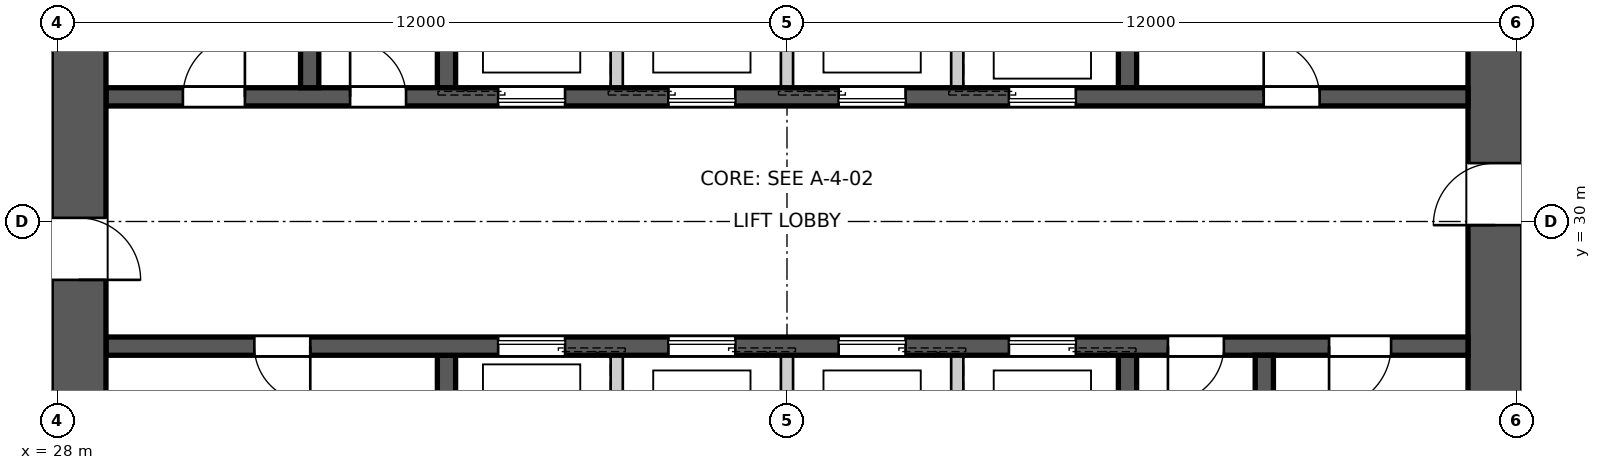
"""IFC4 building model, lengths in metres.
Left out: names, types, materials, properties, quantities, classifications, styles, units other than length and angle.
Written with IfcOpenShell. Run it as: python <this file> out.ifc"""

import sys

from ifc_helpers import new_model, si_unit, direction, frame, frame_2d, origin, place, context, subcontext, project, spatial, polyline, rectangle, outline, extrude, element, fill, save


model = new_model("IFC4")
c1 = context("Model", 3, precision=1e-05, world=origin(), true_north=direction((0.0, 1.0)))
c2 = subcontext(c1, "Body", "Model", "MODEL_VIEW")
j1 = project(units=[si_unit("LENGTHUNIT", "METRE"), si_unit("PLANEANGLEUNIT", "RADIAN")], contexts=[c1])
p1 = place(None, origin())
s1 = spatial("IfcSite", under=j1, at=p1, CompositionType="ELEMENT")
p2 = place(p1, origin())
s2 = spatial("IfcBuilding", under=s1, at=p2, CompositionType="ELEMENT")
p3 = place(p2, origin())
s3 = spatial("IfcBuildingStorey", under=s2, at=p3, CompositionType="ELEMENT", Elevation=0.0)
p4 = place(p3, frame((51.65, 18.8, 0.0), z_axis=(0.0, 0.0, 1.0), x_axis=(0.0, 1.0, 0.0)))
e1 = element("IfcWall", 1, at=p4, inside=s3, PredefinedType="SHEAR", context=c2, shape_type="SweptSolid", body=[
    extrude(outline(polyline([(0.0, -0.45), (22.4, -0.45), (22.4, -0.025), (22.85, -0.025), (22.85, 0.025), (22.4, 0.025), (22.4, 0.45), (0.0, 0.45), (0.0, 0.025), (-0.45, 0.025), (-0.45, -0.025), (0.0, -0.025), (0.0, -0.45)])), origin(), (0.0, 0.0, 1.0), 6.0),
])
p5 = place(p4, frame((11.14, 0.0, 0.0)))
e2 = element("IfcOpeningElement", 2, at=p5, cuts=e1, PredefinedType="OPENING", context=c2, shape_type="SweptSolid", body=[
    extrude(rectangle(XDim=1.02, YDim=2.4, at=frame_2d((0.51, 1.2))), frame((0.0, 0.46, 0.0), z_axis=(0.0, -1.0, 0.0), x_axis=(1.0, 0.0, 0.0)), (0.0, 0.0, 1.0), 0.92),
])
p6 = place(p3, frame((28.35, 41.2, 0.0), z_axis=(0.0, 0.0, 1.0), x_axis=(0.0, -1.0, 0.0)))
e3 = element("IfcWall", 3, at=p6, inside=s3, PredefinedType="SHEAR", context=c2, shape_type="SweptSolid", body=[
    extrude(outline(polyline([(0.0, -0.45), (22.4, -0.45), (22.4, -0.025), (22.85, -0.025), (22.85, 0.025), (22.4, 0.025), (22.4, 0.45), (0.0, 0.45), (0.0, 0.025), (-0.45, 0.025), (-0.45, -0.025), (0.0, -0.025), (0.0, -0.45)])), origin(), (0.0, 0.0, 1.0), 6.0),
])
p7 = place(p6, frame((11.14, 0.0, 0.0)))
e4 = element("IfcOpeningElement", 4, at=p7, cuts=e3, PredefinedType="OPENING", context=c2, shape_type="SweptSolid", body=[
    extrude(rectangle(XDim=1.02, YDim=2.4, at=frame_2d((0.51, 1.2))), frame((0.0, 0.46, 0.0), z_axis=(0.0, -1.0, 0.0), x_axis=(1.0, 0.0, 0.0)), (0.0, 0.0, 1.0), 0.92),
])
p8 = place(p3, frame((28.8, 32.05, 0.0), z_axis=(0.0, 0.0, 1.0), x_axis=(1.0, 0.0, 0.0)))
e5 = element("IfcWall", 5, at=p8, inside=s3, PredefinedType="SHEAR", context=c2, shape_type="SweptSolid", body=[
    extrude(rectangle(XDim=22.4, YDim=0.3, at=frame_2d((11.2, 0.0))), origin(), (0.0, 0.0, 1.0), 6.0),
])
p9 = place(p8, frame((19.04, 0.0, 0.0)))
e6 = element("IfcOpeningElement", 6, at=p9, cuts=e5, PredefinedType="OPENING", context=c2, shape_type="SweptSolid", body=[
    extrude(rectangle(XDim=0.92, YDim=2.1, at=frame_2d((0.46, 1.05))), frame((0.0, 0.16, 0.0), z_axis=(0.0, -1.0, 0.0), x_axis=(1.0, 0.0, 0.0)), (0.0, 0.0, 1.0), 0.32),
])
p10 = place(p8, frame((1.265, 0.0, 0.0)))
e7 = element("IfcOpeningElement", 7, at=p10, cuts=e5, PredefinedType="OPENING", context=c2, shape_type="SweptSolid", body=[
    extrude(rectangle(XDim=1.02, YDim=2.1, at=frame_2d((0.51, 1.05))), frame((0.0, 0.16, 0.0), z_axis=(0.0, -1.0, 0.0), x_axis=(1.0, 0.0, 0.0)), (0.0, 0.0, 1.0), 0.32),
])
p11 = place(p8, frame((4.015, 0.0, 0.0)))
e8 = element("IfcOpeningElement", 8, at=p11, cuts=e5, PredefinedType="OPENING", context=c2, shape_type="SweptSolid", body=[
    extrude(rectangle(XDim=0.92, YDim=2.1, at=frame_2d((0.46, 1.05))), frame((0.0, 0.16, 0.0), z_axis=(0.0, -1.0, 0.0), x_axis=(1.0, 0.0, 0.0)), (0.0, 0.0, 1.0), 0.32),
])
p12 = place(p8, frame((6.45, 0.0, 0.0)))
e9 = element("IfcOpeningElement", 9, at=p12, cuts=e5, PredefinedType="OPENING", context=c2, shape_type="SweptSolid", body=[
    extrude(rectangle(XDim=1.1, YDim=2.1, at=frame_2d((0.55, 1.05))), frame((0.0, 0.16, 0.0), z_axis=(0.0, -1.0, 0.0), x_axis=(1.0, 0.0, 0.0)), (0.0, 0.0, 1.0), 0.32),
])
p13 = place(p8, frame((9.25, 0.0, 0.0)))
e10 = element("IfcOpeningElement", 10, at=p13, cuts=e5, PredefinedType="OPENING", context=c2, shape_type="SweptSolid", body=[
    extrude(rectangle(XDim=1.1, YDim=2.1, at=frame_2d((0.55, 1.05))), frame((0.0, 0.16, 0.0), z_axis=(0.0, -1.0, 0.0), x_axis=(1.0, 0.0, 0.0)), (0.0, 0.0, 1.0), 0.32),
])
p14 = place(p8, frame((12.05, 0.0, 0.0)))
e11 = element("IfcOpeningElement", 11, at=p14, cuts=e5, PredefinedType="OPENING", context=c2, shape_type="SweptSolid", body=[
    extrude(rectangle(XDim=1.1, YDim=2.1, at=frame_2d((0.55, 1.05))), frame((0.0, 0.16, 0.0), z_axis=(0.0, -1.0, 0.0), x_axis=(1.0, 0.0, 0.0)), (0.0, 0.0, 1.0), 0.32),
])
p15 = place(p8, frame((14.85, 0.0, 0.0)))
e12 = element("IfcOpeningElement", 12, at=p15, cuts=e5, PredefinedType="OPENING", context=c2, shape_type="SweptSolid", body=[
    extrude(rectangle(XDim=1.1, YDim=2.1, at=frame_2d((0.55, 1.05))), frame((0.0, 0.16, 0.0), z_axis=(0.0, -1.0, 0.0), x_axis=(1.0, 0.0, 0.0)), (0.0, 0.0, 1.0), 0.32),
])
p16 = place(p3, frame((51.2, 27.95, 0.0), z_axis=(0.0, 0.0, 1.0), x_axis=(-1.0, 0.0, 0.0)))
e13 = element("IfcWall", 13, at=p16, inside=s3, PredefinedType="SHEAR", context=c2, shape_type="SweptSolid", body=[
    extrude(rectangle(XDim=22.4, YDim=0.3, at=frame_2d((11.2, 0.0))), origin(), (0.0, 0.0, 1.0), 6.0),
])
p17 = place(p16, frame((19.04, 0.0, 0.0)))
e14 = element("IfcOpeningElement", 14, at=p17, cuts=e13, PredefinedType="OPENING", context=c2, shape_type="SweptSolid", body=[
    extrude(rectangle(XDim=0.92, YDim=2.1, at=frame_2d((0.46, 1.05))), frame((0.0, 0.16, 0.0), z_axis=(0.0, -1.0, 0.0), x_axis=(1.0, 0.0, 0.0)), (0.0, 0.0, 1.0), 0.32),
])
p18 = place(p16, frame((1.265, 0.0, 0.0)))
e15 = element("IfcOpeningElement", 15, at=p18, cuts=e13, PredefinedType="OPENING", context=c2, shape_type="SweptSolid", body=[
    extrude(rectangle(XDim=1.02, YDim=2.1, at=frame_2d((0.51, 1.05))), frame((0.0, 0.16, 0.0), z_axis=(0.0, -1.0, 0.0), x_axis=(1.0, 0.0, 0.0)), (0.0, 0.0, 1.0), 0.32),
])
p19 = place(p16, frame((4.015, 0.0, 0.0)))
e16 = element("IfcOpeningElement", 16, at=p19, cuts=e13, PredefinedType="OPENING", context=c2, shape_type="SweptSolid", body=[
    extrude(rectangle(XDim=0.92, YDim=2.1, at=frame_2d((0.46, 1.05))), frame((0.0, 0.16, 0.0), z_axis=(0.0, -1.0, 0.0), x_axis=(1.0, 0.0, 0.0)), (0.0, 0.0, 1.0), 0.32),
])
p20 = place(p16, frame((6.45, 0.0, 0.0)))
e17 = element("IfcOpeningElement", 17, at=p20, cuts=e13, PredefinedType="OPENING", context=c2, shape_type="SweptSolid", body=[
    extrude(rectangle(XDim=1.1, YDim=2.1, at=frame_2d((0.55, 1.05))), frame((0.0, 0.16, 0.0), z_axis=(0.0, -1.0, 0.0), x_axis=(1.0, 0.0, 0.0)), (0.0, 0.0, 1.0), 0.32),
])
p21 = place(p16, frame((9.25, 0.0, 0.0)))
e18 = element("IfcOpeningElement", 18, at=p21, cuts=e13, PredefinedType="OPENING", context=c2, shape_type="SweptSolid", body=[
    extrude(rectangle(XDim=1.1, YDim=2.1, at=frame_2d((0.55, 1.05))), frame((0.0, 0.16, 0.0), z_axis=(0.0, -1.0, 0.0), x_axis=(1.0, 0.0, 0.0)), (0.0, 0.0, 1.0), 0.32),
])
p22 = place(p16, frame((12.05, 0.0, 0.0)))
e19 = element("IfcOpeningElement", 19, at=p22, cuts=e13, PredefinedType="OPENING", context=c2, shape_type="SweptSolid", body=[
    extrude(rectangle(XDim=1.1, YDim=2.1, at=frame_2d((0.55, 1.05))), frame((0.0, 0.16, 0.0), z_axis=(0.0, -1.0, 0.0), x_axis=(1.0, 0.0, 0.0)), (0.0, 0.0, 1.0), 0.32),
])
p23 = place(p16, frame((14.85, 0.0, 0.0)))
e20 = element("IfcOpeningElement", 20, at=p23, cuts=e13, PredefinedType="OPENING", context=c2, shape_type="SweptSolid", body=[
    extrude(rectangle(XDim=1.1, YDim=2.1, at=frame_2d((0.55, 1.05))), frame((0.0, 0.16, 0.0), z_axis=(0.0, -1.0, 0.0), x_axis=(1.0, 0.0, 0.0)), (0.0, 0.0, 1.0), 0.32),
])
for number, where, z_axis, x_axis in (
    (21, (34.4, 32.2, 0.0), (0.0, 0.0, 1.0), (0.0, 1.0, 0.0)),
    (22, (45.6, 27.8, 0.0), (0.0, 0.0, 1.0), (0.0, -1.0, 0.0)),
):
    element("IfcWall", number, at=place(p3, frame(where, z_axis=z_axis, x_axis=x_axis)), inside=s3, PredefinedType="SHEAR", context=c2, shape_type="SweptSolid", body=[
        extrude(rectangle(XDim=2.8, YDim=0.3, at=frame_2d((1.4, 0.0))), origin(), (0.0, 0.0, 1.0), 6.0),
    ])
for number, where, z_axis, x_axis in (
    (23, (37.2, 32.2, 0.0), (0.0, 0.0, 1.0), (0.0, 1.0, 0.0)),
    (24, (42.8, 27.8, 0.0), (0.0, 0.0, 1.0), (0.0, -1.0, 0.0)),
    (25, (40.0, 32.2, 0.0), (0.0, 0.0, 1.0), (0.0, 1.0, 0.0)),
    (26, (40.0, 27.8, 0.0), (0.0, 0.0, 1.0), (0.0, -1.0, 0.0)),
    (27, (42.8, 32.2, 0.0), (0.0, 0.0, 1.0), (0.0, 1.0, 0.0)),
    (28, (37.2, 27.8, 0.0), (0.0, 0.0, 1.0), (0.0, -1.0, 0.0)),
):
    element("IfcWall", number, at=place(p3, frame(where, z_axis=z_axis, x_axis=x_axis)), inside=s3, PredefinedType="SOLIDWALL", context=c2, shape_type="SweptSolid", body=[
        extrude(rectangle(XDim=2.8, YDim=0.2, at=frame_2d((1.4, 0.0))), origin(), (0.0, 0.0, 1.0), 6.0),
    ])
for number, where, z_axis, x_axis in (
    (29, (45.6, 32.2, 0.0), (0.0, 0.0, 1.0), (0.0, 1.0, 0.0)),
    (30, (34.4, 27.8, 0.0), (0.0, 0.0, 1.0), (0.0, -1.0, 0.0)),
):
    element("IfcWall", number, at=place(p3, frame(where, z_axis=z_axis, x_axis=x_axis)), inside=s3, PredefinedType="SHEAR", context=c2, shape_type="SweptSolid", body=[
        extrude(rectangle(XDim=2.8, YDim=0.3, at=frame_2d((1.4, 0.0))), origin(), (0.0, 0.0, 1.0), 6.0),
    ])
for number, where, z_axis, x_axis in (
    (31, (32.15, 32.2, 0.0), (0.0, 0.0, 1.0), (0.0, 1.0, 0.0)),
    (32, (47.85, 27.8, 0.0), (0.0, 0.0, 1.0), (0.0, -1.0, 0.0)),
):
    element("IfcWall", number, at=place(p3, frame(where, z_axis=z_axis, x_axis=x_axis)), inside=s3, PredefinedType="SHEAR", context=c2, shape_type="SweptSolid", body=[
        extrude(rectangle(XDim=7.7, YDim=0.3, at=frame_2d((3.85, 0.0))), origin(), (0.0, 0.0, 1.0), 6.0),
    ])
p24 = place(p9, origin())
e33 = element("IfcDoor", 33, at=p24, inside=s3, OperationType="SINGLE_SWING_LEFT", PredefinedType="DOOR", context=c2, shape_type="SweptSolid", body=[
    extrude(rectangle(XDim=0.92, YDim=2.1, at=frame_2d((0.46, 1.05))), frame((0.0, 0.025, 0.0), z_axis=(0.0, -1.0, 0.0), x_axis=(1.0, 0.0, 0.0)), (0.0, 0.0, 1.0), 0.05),
])
fill(e6, e33)
p25 = place(p17, origin())
e34 = element("IfcDoor", 34, at=p25, inside=s3, OperationType="SINGLE_SWING_LEFT", PredefinedType="DOOR", context=c2, shape_type="SweptSolid", body=[
    extrude(rectangle(XDim=0.92, YDim=2.1, at=frame_2d((0.46, 1.05))), frame((0.0, 0.025, 0.0), z_axis=(0.0, -1.0, 0.0), x_axis=(1.0, 0.0, 0.0)), (0.0, 0.0, 1.0), 0.05),
])
fill(e14, e34)
p26 = place(p18, origin())
e35 = element("IfcDoor", 35, at=p26, inside=s3, OperationType="SINGLE_SWING_RIGHT", PredefinedType="DOOR", context=c2, shape_type="SweptSolid", body=[
    extrude(rectangle(XDim=1.02, YDim=2.1, at=frame_2d((0.51, 1.05))), frame((0.0, 0.025, 0.0), z_axis=(0.0, -1.0, 0.0), x_axis=(1.0, 0.0, 0.0)), (0.0, 0.0, 1.0), 0.05),
])
fill(e15, e35)
p27 = place(p10, origin())
e36 = element("IfcDoor", 36, at=p27, inside=s3, OperationType="SINGLE_SWING_RIGHT", PredefinedType="DOOR", context=c2, shape_type="SweptSolid", body=[
    extrude(rectangle(XDim=1.02, YDim=2.1, at=frame_2d((0.51, 1.05))), frame((0.0, 0.025, 0.0), z_axis=(0.0, -1.0, 0.0), x_axis=(1.0, 0.0, 0.0)), (0.0, 0.0, 1.0), 0.05),
])
fill(e7, e36)
p28 = place(p11, origin())
e37 = element("IfcDoor", 37, at=p28, inside=s3, OperationType="SINGLE_SWING_LEFT", PredefinedType="DOOR", context=c2, shape_type="SweptSolid", body=[
    extrude(rectangle(XDim=0.92, YDim=2.1, at=frame_2d((0.46, 1.05))), frame((0.0, 0.025, 0.0), z_axis=(0.0, -1.0, 0.0), x_axis=(1.0, 0.0, 0.0)), (0.0, 0.0, 1.0), 0.05),
])
fill(e8, e37)
p29 = place(p19, origin())
e38 = element("IfcDoor", 38, at=p29, inside=s3, OperationType="SINGLE_SWING_RIGHT", PredefinedType="DOOR", context=c2, shape_type="SweptSolid", body=[
    extrude(rectangle(XDim=0.92, YDim=2.1, at=frame_2d((0.46, 1.05))), frame((0.0, 0.025, 0.0), z_axis=(0.0, -1.0, 0.0), x_axis=(1.0, 0.0, 0.0)), (0.0, 0.0, 1.0), 0.05),
])
fill(e16, e38)
p30 = place(p5, origin())
e39 = element("IfcDoor", 39, at=p30, inside=s3, OperationType="SINGLE_SWING_LEFT", PredefinedType="DOOR", context=c2, shape_type="SweptSolid", body=[
    extrude(rectangle(XDim=1.02, YDim=2.4, at=frame_2d((0.51, 1.2))), frame((0.0, 0.025, 0.0), z_axis=(0.0, -1.0, 0.0), x_axis=(1.0, 0.0, 0.0)), (0.0, 0.0, 1.0), 0.05),
])
fill(e2, e39)
p31 = place(p7, origin())
e40 = element("IfcDoor", 40, at=p31, inside=s3, OperationType="SINGLE_SWING_RIGHT", PredefinedType="DOOR", context=c2, shape_type="SweptSolid", body=[
    extrude(rectangle(XDim=1.02, YDim=2.4, at=frame_2d((0.51, 1.2))), frame((0.0, 0.025, 0.0), z_axis=(0.0, -1.0, 0.0), x_axis=(1.0, 0.0, 0.0)), (0.0, 0.0, 1.0), 0.05),
])
fill(e4, e40)
p32 = place(p12, origin())
e41 = element("IfcDoor", 41, at=p32, inside=s3, OperationType="SLIDING_TO_LEFT", PredefinedType="DOOR", context=c2, shape_type="SweptSolid", body=[
    extrude(rectangle(XDim=1.1, YDim=2.1, at=frame_2d((0.55, 1.05))), frame((0.0, 0.025, 0.0), z_axis=(0.0, -1.0, 0.0), x_axis=(1.0, 0.0, 0.0)), (0.0, 0.0, 1.0), 0.05),
])
fill(e9, e41)
p33 = place(p20, origin())
e42 = element("IfcDoor", 42, at=p33, inside=s3, OperationType="SLIDING_TO_LEFT", PredefinedType="DOOR", context=c2, shape_type="SweptSolid", body=[
    extrude(rectangle(XDim=1.1, YDim=2.1, at=frame_2d((0.55, 1.05))), frame((0.0, 0.025, 0.0), z_axis=(0.0, -1.0, 0.0), x_axis=(1.0, 0.0, 0.0)), (0.0, 0.0, 1.0), 0.05),
])
fill(e17, e42)
p34 = place(p13, origin())
e43 = element("IfcDoor", 43, at=p34, inside=s3, OperationType="SLIDING_TO_LEFT", PredefinedType="DOOR", context=c2, shape_type="SweptSolid", body=[
    extrude(rectangle(XDim=1.1, YDim=2.1, at=frame_2d((0.55, 1.05))), frame((0.0, 0.025, 0.0), z_axis=(0.0, -1.0, 0.0), x_axis=(1.0, 0.0, 0.0)), (0.0, 0.0, 1.0), 0.05),
])
fill(e10, e43)
p35 = place(p21, origin())
e44 = element("IfcDoor", 44, at=p35, inside=s3, OperationType="SLIDING_TO_LEFT", PredefinedType="DOOR", context=c2, shape_type="SweptSolid", body=[
    extrude(rectangle(XDim=1.1, YDim=2.1, at=frame_2d((0.55, 1.05))), frame((0.0, 0.025, 0.0), z_axis=(0.0, -1.0, 0.0), x_axis=(1.0, 0.0, 0.0)), (0.0, 0.0, 1.0), 0.05),
])
fill(e18, e44)
p36 = place(p14, origin())
e45 = element("IfcDoor", 45, at=p36, inside=s3, OperationType="SLIDING_TO_LEFT", PredefinedType="DOOR", context=c2, shape_type="SweptSolid", body=[
    extrude(rectangle(XDim=1.1, YDim=2.1, at=frame_2d((0.55, 1.05))), frame((0.0, 0.025, 0.0), z_axis=(0.0, -1.0, 0.0), x_axis=(1.0, 0.0, 0.0)), (0.0, 0.0, 1.0), 0.05),
])
fill(e11, e45)
p37 = place(p22, origin())
e46 = element("IfcDoor", 46, at=p37, inside=s3, OperationType="SLIDING_TO_LEFT", PredefinedType="DOOR", context=c2, shape_type="SweptSolid", body=[
    extrude(rectangle(XDim=1.1, YDim=2.1, at=frame_2d((0.55, 1.05))), frame((0.0, 0.025, 0.0), z_axis=(0.0, -1.0, 0.0), x_axis=(1.0, 0.0, 0.0)), (0.0, 0.0, 1.0), 0.05),
])
fill(e19, e46)
p38 = place(p15, origin())
e47 = element("IfcDoor", 47, at=p38, inside=s3, OperationType="SLIDING_TO_LEFT", PredefinedType="DOOR", context=c2, shape_type="SweptSolid", body=[
    extrude(rectangle(XDim=1.1, YDim=2.1, at=frame_2d((0.55, 1.05))), frame((0.0, 0.025, 0.0), z_axis=(0.0, -1.0, 0.0), x_axis=(1.0, 0.0, 0.0)), (0.0, 0.0, 1.0), 0.05),
])
fill(e12, e47)
p39 = place(p23, origin())
e48 = element("IfcDoor", 48, at=p39, inside=s3, OperationType="SLIDING_TO_LEFT", PredefinedType="DOOR", context=c2, shape_type="SweptSolid", body=[
    extrude(rectangle(XDim=1.1, YDim=2.1, at=frame_2d((0.55, 1.05))), frame((0.0, 0.025, 0.0), z_axis=(0.0, -1.0, 0.0), x_axis=(1.0, 0.0, 0.0)), (0.0, 0.0, 1.0), 0.05),
])
fill(e20, e48)
save(model, sys.argv[1])
